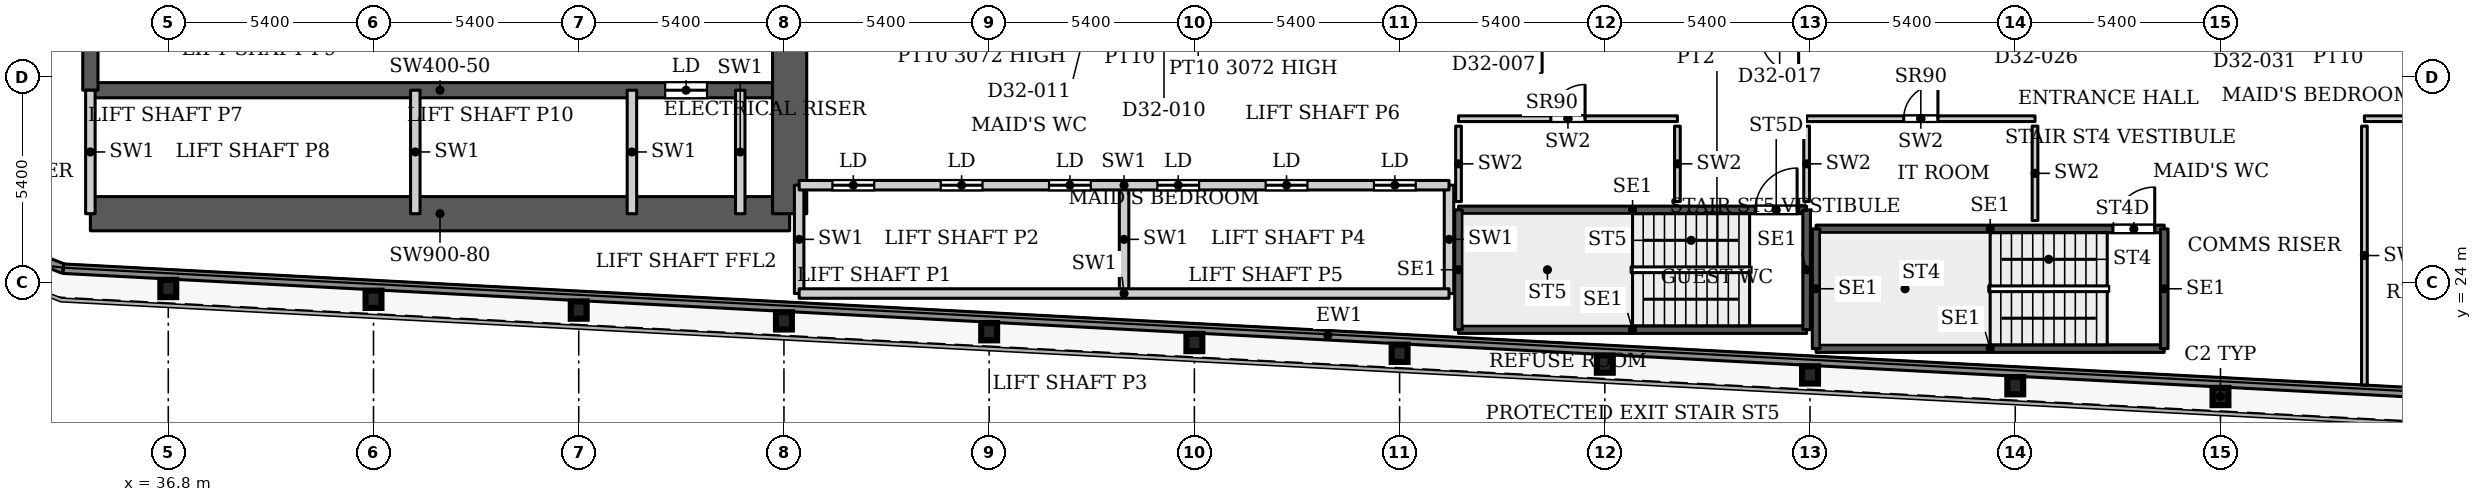
"""IFC4 building model, lengths in metres.
Left out: names, types, materials, properties, quantities, classifications, styles, units other than length and angle.
Written with IfcOpenShell. Run it as: python <this file> out.ifc"""

import sys

from ifc_helpers import new_model, si_unit, direction, frame, frame_2d, origin, origin_2d, place, context, subcontext, project, spatial, rectangle, i_section, extrude, source, transform, mapped, element, fill, save


model = new_model("IFC4")
c1 = context("Model", 3, precision=1e-05, world=origin(), true_north=direction((0.0, 1.0)))
c2 = subcontext(c1, "Body", "Model", "MODEL_VIEW")
j1 = project(units=[si_unit("LENGTHUNIT", "METRE"), si_unit("PLANEANGLEUNIT", "RADIAN")], contexts=[c1])
p1 = place(None, origin())
s1 = spatial("IfcSite", under=j1, at=p1, CompositionType="ELEMENT")
p2 = place(p1, origin())
s2 = spatial("IfcBuilding", under=s1, at=p2, CompositionType="ELEMENT")
p3 = place(p2, frame((0.0, 0.0, 140.9)))
s3 = spatial("IfcBuildingStorey", under=s2, at=p3, CompositionType="ELEMENT", Elevation=140.9)
for number, where, z_axis, x_axis in (
    (1, (90.8, 20.99, 0.0), (0.0, 0.0, 1.0), (1.0, 0.0, 0.0)),
    (2, (85.4, 21.274, 0.0), (0.0, 0.0, 1.0), (1.0, 0.0, 0.0)),
    (3, (80.0, 21.558, 0.0), (0.0, 0.0, 1.0), (1.0, 0.0, 0.0)),
    (4, (74.6, 21.843, 0.0), (0.0, 0.0, 1.0), (1.0, 0.0, 0.0)),
    (5, (69.2, 22.127, 0.0), (0.0, 0.0, 1.0), (1.0, 0.0, 0.0)),
    (6, (63.8, 22.411, 0.0), (0.0, 0.0, 1.0), (1.0, 0.0, 0.0)),
    (7, (58.4, 22.695, 0.0), (0.0, 0.0, 1.0), (1.0, 0.0, 0.0)),
    (8, (53.0, 22.98, 0.0), (0.0, 0.0, 1.0), (1.0, 0.0, 0.0)),
    (9, (47.6, 23.264, 0.0), (0.0, 0.0, 1.0), (1.0, 0.0, 0.0)),
    (10, (42.2, 23.548, 0.0), (0.0, 0.0, 1.0), (1.0, 0.0, 0.0)),
    (11, (36.8, 23.832, 0.0), (0.0, 0.0, 1.0), (1.0, 0.0, 0.0)),
):
    element("IfcColumn", number, at=place(p3, frame(where, z_axis=z_axis, x_axis=x_axis)), inside=s3, PredefinedType="COLUMN", context=c2, shape_type="SweptSolid", body=[
        extrude(i_section(OverallWidth=0.418, OverallDepth=0.455, WebThickness=0.042, FlangeThickness=0.068, FilletRadius=0.014, at=origin_2d()), origin(), (0.0, 0.0, 1.0), 3.9),
    ])
p4 = place(p3, frame((34.75, 25.8, 0.0), z_axis=(0.0, 0.0, 1.0), x_axis=(1.0, 0.0, 0.0)))
e12 = element("IfcWall", 12, at=p4, inside=s3, PredefinedType="SHEAR", context=c2, shape_type="SweptSolid", body=[
    extrude(rectangle(XDim=18.4, YDim=0.9, at=frame_2d((9.2, 0.0))), origin(), (0.0, 0.0, 1.0), 3.9),
])
p5 = place(p3, frame((34.75, 29.05, 0.0), z_axis=(0.0, 0.0, 1.0), x_axis=(1.0, 0.0, 0.0)))
e13 = element("IfcWall", 13, at=p5, inside=s3, PredefinedType="SHEAR", context=c2, shape_type="SweptSolid", body=[
    extrude(rectangle(XDim=18.4, YDim=0.4, at=frame_2d((9.2, 0.0))), origin(), (0.0, 0.0, 1.0), 3.9),
])
p6 = place(p5, frame((15.125, 0.0, 0.0)))
e14 = element("IfcOpeningElement", 14, at=p6, cuts=e13, PredefinedType="OPENING", context=c2, shape_type="SweptSolid", body=[
    extrude(rectangle(XDim=1.1, YDim=2.2, at=frame_2d((0.55, 1.1))), frame((0.0, 0.21, 0.0), z_axis=(0.0, -1.0, 0.0), x_axis=(1.0, 0.0, 0.0)), (0.0, 0.0, 1.0), 0.42),
])
p7 = place(p3, frame((34.75, 29.05, 0.0), z_axis=(0.0, 0.0, 1.0), x_axis=(0.0, 1.0, 0.0)))
e15 = element("IfcWall", 15, at=p7, inside=s3, PredefinedType="SHEAR", context=c2, shape_type="SweptSolid", body=[
    extrude(rectangle(XDim=18.45, YDim=0.4, at=frame_2d((9.225, 0.0))), origin(), (0.0, 0.0, 1.0), 3.9),
])
p8 = place(p7, frame((8.025, 0.0, 0.0)))
e16 = element("IfcOpeningElement", 16, at=p8, cuts=e15, PredefinedType="OPENING", context=c2, shape_type="SweptSolid", body=[
    extrude(rectangle(XDim=1.1, YDim=2.2, at=frame_2d((0.55, 1.1))), frame((0.0, 0.21, 0.0), z_axis=(0.0, -1.0, 0.0), x_axis=(1.0, 0.0, 0.0)), (0.0, 0.0, 1.0), 0.42),
])
p9 = place(p7, frame((10.875, 0.0, 0.0)))
e17 = element("IfcOpeningElement", 17, at=p9, cuts=e15, PredefinedType="OPENING", context=c2, shape_type="SweptSolid", body=[
    extrude(rectangle(XDim=1.1, YDim=2.2, at=frame_2d((0.55, 1.1))), frame((0.0, 0.21, 0.0), z_axis=(0.0, -1.0, 0.0), x_axis=(1.0, 0.0, 0.0)), (0.0, 0.0, 1.0), 0.42),
])
p10 = place(p7, frame((13.725, 0.0, 0.0)))
e18 = element("IfcOpeningElement", 18, at=p10, cuts=e15, PredefinedType="OPENING", context=c2, shape_type="SweptSolid", body=[
    extrude(rectangle(XDim=1.1, YDim=2.2, at=frame_2d((0.55, 1.1))), frame((0.0, 0.21, 0.0), z_axis=(0.0, -1.0, 0.0), x_axis=(1.0, 0.0, 0.0)), (0.0, 0.0, 1.0), 0.42),
])
p11 = place(p7, frame((15.95, 0.0, 0.0)))
e19 = element("IfcOpeningElement", 19, at=p11, cuts=e15, PredefinedType="OPENING", context=c2, shape_type="SweptSolid", body=[
    extrude(rectangle(XDim=1.1, YDim=2.2, at=frame_2d((0.55, 1.1))), frame((0.0, 0.21, 0.0), z_axis=(0.0, -1.0, 0.0), x_axis=(1.0, 0.0, 0.0)), (0.0, 0.0, 1.0), 0.42),
])
p12 = place(p3, frame((53.15, 25.8, 0.0), z_axis=(0.0, 0.0, 1.0), x_axis=(0.0, 1.0, 0.0)))
e20 = element("IfcWall", 20, at=p12, inside=s3, PredefinedType="SHEAR", context=c2, shape_type="SweptSolid", body=[
    extrude(rectangle(XDim=10.4, YDim=0.9, at=frame_2d((5.2, 0.0))), origin(), (0.0, 0.0, 1.0), 3.9),
])
p13 = place(p3, frame((34.039, 24.353, 0.0), z_axis=(0.0, 0.0, 1.0), x_axis=(-0.929352825399, 0.369192803184, 0.0)))
e21 = element("IfcWall", 21, at=p13, inside=s3, PredefinedType="SOLIDWALL", context=c2, shape_type="SweptSolid", body=[
    extrude(rectangle(XDim=4.656, YDim=0.25, at=frame_2d((2.328, 0.0))), origin(), (0.0, 0.0, 1.0), 3.75),
])
p14 = place(p3, frame((100.586, 20.85, 0.0), z_axis=(0.0, 0.0, 1.0), x_axis=(-0.99861746497, 0.052565755559, 0.0)))
e22 = element("IfcWall", 22, at=p14, inside=s3, PredefinedType="SOLIDWALL", context=c2, shape_type="SweptSolid", body=[
    extrude(rectangle(XDim=66.639, YDim=0.25, at=frame_2d((33.319, 0.0))), origin(), (0.0, 0.0, 1.0), 3.75),
])
p15 = place(p3, frame((80.16, 22.25, 0.0), z_axis=(0.0, 0.0, 1.0), x_axis=(1.0, 0.0, 0.0)))
e23 = element("IfcWall", 23, at=p15, inside=s3, PredefinedType="SHEAR", context=c2, shape_type="SweptSolid", body=[
    extrude(rectangle(XDim=9.16, YDim=0.2, at=frame_2d((4.58, 0.0))), origin(), (0.0, 0.0, 1.0), 3.9),
])
p16 = place(p3, frame((80.16, 25.4, 0.0), z_axis=(0.0, 0.0, 1.0), x_axis=(1.0, 0.0, 0.0)))
e24 = element("IfcWall", 24, at=p16, inside=s3, PredefinedType="SHEAR", context=c2, shape_type="SweptSolid", body=[
    extrude(rectangle(XDim=9.16, YDim=0.2, at=frame_2d((4.58, 0.0))), origin(), (0.0, 0.0, 1.0), 3.9),
])
p17 = place(p16, frame((7.81, 0.0, 0.0)))
e25 = element("IfcOpeningElement", 25, at=p17, cuts=e24, PredefinedType="OPENING", context=c2, shape_type="SweptSolid", body=[
    extrude(rectangle(XDim=1.1, YDim=2.2, at=frame_2d((0.55, 1.1))), frame((0.0, 0.11, 0.0), z_axis=(0.0, -1.0, 0.0), x_axis=(1.0, 0.0, 0.0)), (0.0, 0.0, 1.0), 0.22),
])
for number, where, z_axis, x_axis in (
    (26, (80.16, 22.25, 0.0), (0.0, 0.0, 1.0), (0.0, 1.0, 0.0)),
    (27, (89.32, 22.25, 0.0), (0.0, 0.0, 1.0), (0.0, 1.0, 0.0)),
):
    element("IfcWall", number, at=place(p3, frame(where, z_axis=z_axis, x_axis=x_axis)), inside=s3, PredefinedType="SHEAR", context=c2, shape_type="SweptSolid", body=[
        extrude(rectangle(XDim=3.15, YDim=0.2, at=frame_2d((1.575, 0.0))), origin(), (0.0, 0.0, 1.0), 3.9),
    ])
p18 = place(p3, frame((70.75, 22.75, 0.0), z_axis=(0.0, 0.0, 1.0), x_axis=(1.0, 0.0, 0.0)))
e28 = element("IfcWall", 28, at=p18, inside=s3, PredefinedType="SHEAR", context=c2, shape_type="SweptSolid", body=[
    extrude(rectangle(XDim=9.16, YDim=0.2, at=frame_2d((4.58, 0.0))), origin(), (0.0, 0.0, 1.0), 3.9),
])
p19 = place(p3, frame((70.75, 25.9, 0.0), z_axis=(0.0, 0.0, 1.0), x_axis=(1.0, 0.0, 0.0)))
e29 = element("IfcWall", 29, at=p19, inside=s3, PredefinedType="SHEAR", context=c2, shape_type="SweptSolid", body=[
    extrude(rectangle(XDim=9.16, YDim=0.2, at=frame_2d((4.58, 0.0))), origin(), (0.0, 0.0, 1.0), 3.9),
])
p20 = place(p19, frame((7.81, 0.0, 0.0)))
e30 = element("IfcOpeningElement", 30, at=p20, cuts=e29, PredefinedType="OPENING", context=c2, shape_type="SweptSolid", body=[
    extrude(rectangle(XDim=1.1, YDim=2.2, at=frame_2d((0.55, 1.1))), frame((0.0, 0.11, 0.0), z_axis=(0.0, -1.0, 0.0), x_axis=(1.0, 0.0, 0.0)), (0.0, 0.0, 1.0), 0.22),
])
for number, where, z_axis, x_axis in (
    (31, (70.75, 22.75, 0.0), (0.0, 0.0, 1.0), (0.0, 1.0, 0.0)),
    (32, (79.91, 22.75, 0.0), (0.0, 0.0, 1.0), (0.0, 1.0, 0.0)),
):
    element("IfcWall", number, at=place(p3, frame(where, z_axis=z_axis, x_axis=x_axis)), inside=s3, PredefinedType="SHEAR", context=c2, shape_type="SweptSolid", body=[
        extrude(rectangle(XDim=3.15, YDim=0.2, at=frame_2d((1.575, 0.0))), origin(), (0.0, 0.0, 1.0), 3.9),
    ])
for number, where, z_axis, x_axis in (
    (33, (34.75, 25.8, 0.0), (0.0, 0.0, 1.0), (0.0, 1.0, 0.0)),
    (34, (43.3, 25.8, 0.0), (0.0, 0.0, 1.0), (0.0, 1.0, 0.0)),
    (35, (49.0, 25.8, 0.0), (0.0, 0.0, 1.0), (0.0, 1.0, 0.0)),
    (36, (51.85, 25.8, 0.0), (0.0, 0.0, 1.0), (0.0, 1.0, 0.0)),
):
    element("IfcWall", number, at=place(p3, frame(where, z_axis=z_axis, x_axis=x_axis)), inside=s3, PredefinedType="PARTITIONING", context=c2, shape_type="SweptSolid", body=[
        extrude(rectangle(XDim=3.25, YDim=0.25, at=frame_2d((1.625, 0.0))), origin(), (0.0, 0.0, 1.0), 3.9),
    ])
for number, where, z_axis, x_axis in (
    (37, (53.4, 23.7, 0.0), (0.0, 0.0, 1.0), (0.0, 1.0, 0.0)),
    (38, (61.95, 23.7, 0.0), (0.0, 0.0, 1.0), (0.0, 1.0, 0.0)),
    (39, (70.5, 23.7, 0.0), (0.0, 0.0, 1.0), (0.0, 1.0, 0.0)),
):
    element("IfcWall", number, at=place(p3, frame(where, z_axis=z_axis, x_axis=x_axis)), inside=s3, PredefinedType="PARTITIONING", context=c2, shape_type="SweptSolid", body=[
        extrude(rectangle(XDim=2.85, YDim=0.25, at=frame_2d((1.425, 0.0))), origin(), (0.0, 0.0, 1.0), 3.9),
    ])
p21 = place(p3, frame((53.4, 23.7, 0.0), z_axis=(0.0, 0.0, 1.0), x_axis=(1.0, 0.0, 0.0)))
e40 = element("IfcWall", 40, at=p21, inside=s3, PredefinedType="PARTITIONING", context=c2, shape_type="SweptSolid", body=[
    extrude(rectangle(XDim=17.1, YDim=0.25, at=frame_2d((8.55, 0.0))), origin(), (0.0, 0.0, 1.0), 3.9),
])
p22 = place(p3, frame((53.4, 26.55, 0.0), z_axis=(0.0, 0.0, 1.0), x_axis=(1.0, 0.0, 0.0)))
e41 = element("IfcWall", 41, at=p22, inside=s3, PredefinedType="PARTITIONING", context=c2, shape_type="SweptSolid", body=[
    extrude(rectangle(XDim=17.1, YDim=0.25, at=frame_2d((8.55, 0.0))), origin(), (0.0, 0.0, 1.0), 3.9),
])
p23 = place(p22, frame((0.875, 0.0, 0.0)))
e42 = element("IfcOpeningElement", 42, at=p23, cuts=e41, PredefinedType="OPENING", context=c2, shape_type="SweptSolid", body=[
    extrude(rectangle(XDim=1.1, YDim=2.2, at=frame_2d((0.55, 1.1))), frame((0.0, 0.135, 0.0), z_axis=(0.0, -1.0, 0.0), x_axis=(1.0, 0.0, 0.0)), (0.0, 0.0, 1.0), 0.27),
])
p24 = place(p22, frame((3.725, 0.0, 0.0)))
e43 = element("IfcOpeningElement", 43, at=p24, cuts=e41, PredefinedType="OPENING", context=c2, shape_type="SweptSolid", body=[
    extrude(rectangle(XDim=1.1, YDim=2.2, at=frame_2d((0.55, 1.1))), frame((0.0, 0.135, 0.0), z_axis=(0.0, -1.0, 0.0), x_axis=(1.0, 0.0, 0.0)), (0.0, 0.0, 1.0), 0.27),
])
p25 = place(p22, frame((6.575, 0.0, 0.0)))
e44 = element("IfcOpeningElement", 44, at=p25, cuts=e41, PredefinedType="OPENING", context=c2, shape_type="SweptSolid", body=[
    extrude(rectangle(XDim=1.1, YDim=2.2, at=frame_2d((0.55, 1.1))), frame((0.0, 0.135, 0.0), z_axis=(0.0, -1.0, 0.0), x_axis=(1.0, 0.0, 0.0)), (0.0, 0.0, 1.0), 0.27),
])
p26 = place(p22, frame((9.425, 0.0, 0.0)))
e45 = element("IfcOpeningElement", 45, at=p26, cuts=e41, PredefinedType="OPENING", context=c2, shape_type="SweptSolid", body=[
    extrude(rectangle(XDim=1.1, YDim=2.2, at=frame_2d((0.55, 1.1))), frame((0.0, 0.135, 0.0), z_axis=(0.0, -1.0, 0.0), x_axis=(1.0, 0.0, 0.0)), (0.0, 0.0, 1.0), 0.27),
])
p27 = place(p22, frame((12.275, 0.0, 0.0)))
e46 = element("IfcOpeningElement", 46, at=p27, cuts=e41, PredefinedType="OPENING", context=c2, shape_type="SweptSolid", body=[
    extrude(rectangle(XDim=1.1, YDim=2.2, at=frame_2d((0.55, 1.1))), frame((0.0, 0.135, 0.0), z_axis=(0.0, -1.0, 0.0), x_axis=(1.0, 0.0, 0.0)), (0.0, 0.0, 1.0), 0.27),
])
p28 = place(p22, frame((15.125, 0.0, 0.0)))
e47 = element("IfcOpeningElement", 47, at=p28, cuts=e41, PredefinedType="OPENING", context=c2, shape_type="SweptSolid", body=[
    extrude(rectangle(XDim=1.1, YDim=2.2, at=frame_2d((0.55, 1.1))), frame((0.0, 0.135, 0.0), z_axis=(0.0, -1.0, 0.0), x_axis=(1.0, 0.0, 0.0)), (0.0, 0.0, 1.0), 0.27),
])
p29 = place(p3, frame((70.75, 28.3, 0.0), z_axis=(0.0, 0.0, 1.0), x_axis=(1.0, 0.0, 0.0)))
e48 = element("IfcWall", 48, at=p29, inside=s3, PredefinedType="PARTITIONING", context=c2, shape_type="SweptSolid", body=[
    extrude(rectangle(XDim=5.76, YDim=0.15, at=frame_2d((2.88, 0.0))), origin(), (0.0, 0.0, 1.0), 3.9),
])
p30 = place(p29, frame((2.43, 0.0, 0.0)))
e49 = element("IfcOpeningElement", 49, at=p30, cuts=e48, PredefinedType="OPENING", context=c2, shape_type="SweptSolid", body=[
    extrude(rectangle(XDim=0.9, YDim=2.2, at=frame_2d((0.45, 1.1))), frame((0.0, 0.085, 0.0), z_axis=(0.0, -1.0, 0.0), x_axis=(1.0, 0.0, 0.0)), (0.0, 0.0, 1.0), 0.17),
])
for number, where, z_axis, x_axis in (
    (50, (70.75, 26.12, 0.0), (0.0, 0.0, 1.0), (0.0, 1.0, 0.0)),
    (51, (76.51, 26.12, 0.0), (0.0, 0.0, 1.0), (0.0, 1.0, 0.0)),
):
    element("IfcWall", number, at=place(p3, frame(where, z_axis=z_axis, x_axis=x_axis)), inside=s3, PredefinedType="PARTITIONING", context=c2, shape_type="SweptSolid", body=[
        extrude(rectangle(XDim=1.985, YDim=0.15, at=frame_2d((0.992, 0.0))), origin(), (0.0, 0.0, 1.0), 3.9),
    ])
p31 = place(p3, frame((79.91, 28.3, 0.0), z_axis=(0.0, 0.0, 1.0), x_axis=(1.0, 0.0, 0.0)))
e52 = element("IfcWall", 52, at=p31, inside=s3, PredefinedType="PARTITIONING", context=c2, shape_type="SweptSolid", body=[
    extrude(rectangle(XDim=6.01, YDim=0.15, at=frame_2d((3.005, 0.0))), origin(), (0.0, 0.0, 1.0), 3.9),
])
p32 = place(p31, frame((2.555, 0.0, 0.0)))
e53 = element("IfcOpeningElement", 53, at=p32, cuts=e52, PredefinedType="OPENING", context=c2, shape_type="SweptSolid", body=[
    extrude(rectangle(XDim=0.9, YDim=2.2, at=frame_2d((0.45, 1.1))), frame((0.0, 0.085, 0.0), z_axis=(0.0, -1.0, 0.0), x_axis=(1.0, 0.0, 0.0)), (0.0, 0.0, 1.0), 0.17),
])
p33 = place(p3, frame((79.91, 26.12, 0.0), z_axis=(0.0, 0.0, 1.0), x_axis=(0.0, 1.0, 0.0)))
e54 = element("IfcWall", 54, at=p33, inside=s3, PredefinedType="PARTITIONING", context=c2, shape_type="SweptSolid", body=[
    extrude(rectangle(XDim=1.985, YDim=0.15, at=frame_2d((0.992, 0.0))), origin(), (0.0, 0.0, 1.0), 3.9),
])
p34 = place(p3, frame((85.92, 25.62, 0.0), z_axis=(0.0, 0.0, 1.0), x_axis=(0.0, 1.0, 0.0)))
e55 = element("IfcWall", 55, at=p34, inside=s3, PredefinedType="PARTITIONING", context=c2, shape_type="SweptSolid", body=[
    extrude(rectangle(XDim=2.485, YDim=0.15, at=frame_2d((1.242, 0.0))), origin(), (0.0, 0.0, 1.0), 3.9),
])
p35 = place(p3, frame((94.587, 28.3, 0.0), z_axis=(0.0, 0.0, 1.0), x_axis=(1.0, 0.0, 0.0)))
e56 = element("IfcWall", 56, at=p35, inside=s3, PredefinedType="PARTITIONING", context=c2, shape_type="SweptSolid", body=[
    extrude(rectangle(XDim=5.311, YDim=0.15, at=frame_2d((2.656, 0.0))), origin(), (0.0, 0.0, 1.0), 3.9),
])
p36 = place(p35, frame((1.256, 0.0, 0.0)))
e57 = element("IfcOpeningElement", 57, at=p36, cuts=e56, PredefinedType="OPENING", context=c2, shape_type="SweptSolid", body=[
    extrude(rectangle(XDim=0.9, YDim=2.2, at=frame_2d((0.45, 1.1))), frame((0.0, 0.085, 0.0), z_axis=(0.0, -1.0, 0.0), x_axis=(1.0, 0.0, 0.0)), (0.0, 0.0, 1.0), 0.17),
])
p37 = place(p3, frame((94.587, 21.293, 0.0), z_axis=(0.0, 0.0, 1.0), x_axis=(0.0, 1.0, 0.0)))
e58 = element("IfcWall", 58, at=p37, inside=s3, PredefinedType="PARTITIONING", context=c2, shape_type="SweptSolid", body=[
    extrude(rectangle(XDim=6.812, YDim=0.15, at=frame_2d((3.406, 0.0))), origin(), (0.0, 0.0, 1.0), 3.9),
])
m1 = source(origin(), c2, "Body", "SweptSolid", [
    extrude(rectangle(XDim=1.1, YDim=2.2, at=frame_2d((0.55, 1.1))), frame((0.0, 0.025, 0.0), z_axis=(0.0, -1.0, 0.0), x_axis=(1.0, 0.0, 0.0)), (0.0, 0.0, 1.0), 0.05),
])
p38 = place(p23, origin())
e59 = element("IfcDoor", 59, at=p38, inside=s3, OperationType="SLIDING_TO_LEFT", PredefinedType="DOOR", context=c2, shape_type="MappedRepresentation", body=[
    mapped(m1, transform((0.0, 0.0, 0.0), x_axis=(1.0, 0.0, 0.0), y_axis=(0.0, 1.0, 0.0), z_axis=(0.0, 0.0, 1.0), scale=1.0)),
])
fill(e42, e59)
p39 = place(p24, origin())
e60 = element("IfcDoor", 60, at=p39, inside=s3, OperationType="SLIDING_TO_LEFT", PredefinedType="DOOR", context=c2, shape_type="MappedRepresentation", body=[
    mapped(m1, transform((0.0, 0.0, 0.0), x_axis=(1.0, 0.0, 0.0), y_axis=(0.0, 1.0, 0.0), z_axis=(0.0, 0.0, 1.0), scale=1.0)),
])
fill(e43, e60)
p40 = place(p25, origin())
e61 = element("IfcDoor", 61, at=p40, inside=s3, OperationType="SLIDING_TO_LEFT", PredefinedType="DOOR", context=c2, shape_type="MappedRepresentation", body=[
    mapped(m1, transform((0.0, 0.0, 0.0), x_axis=(1.0, 0.0, 0.0), y_axis=(0.0, 1.0, 0.0), z_axis=(0.0, 0.0, 1.0), scale=1.0)),
])
fill(e44, e61)
p41 = place(p26, origin())
e62 = element("IfcDoor", 62, at=p41, inside=s3, OperationType="SLIDING_TO_LEFT", PredefinedType="DOOR", context=c2, shape_type="MappedRepresentation", body=[
    mapped(m1, transform((0.0, 0.0, 0.0), x_axis=(1.0, 0.0, 0.0), y_axis=(0.0, 1.0, 0.0), z_axis=(0.0, 0.0, 1.0), scale=1.0)),
])
fill(e45, e62)
p42 = place(p27, origin())
e63 = element("IfcDoor", 63, at=p42, inside=s3, OperationType="SLIDING_TO_LEFT", PredefinedType="DOOR", context=c2, shape_type="MappedRepresentation", body=[
    mapped(m1, transform((0.0, 0.0, 0.0), x_axis=(1.0, 0.0, 0.0), y_axis=(0.0, 1.0, 0.0), z_axis=(0.0, 0.0, 1.0), scale=1.0)),
])
fill(e46, e63)
p43 = place(p28, origin())
e64 = element("IfcDoor", 64, at=p43, inside=s3, OperationType="SLIDING_TO_LEFT", PredefinedType="DOOR", context=c2, shape_type="MappedRepresentation", body=[
    mapped(m1, transform((0.0, 0.0, 0.0), x_axis=(1.0, 0.0, 0.0), y_axis=(0.0, 1.0, 0.0), z_axis=(0.0, 0.0, 1.0), scale=1.0)),
])
fill(e47, e64)
p44 = place(p6, origin())
e65 = element("IfcDoor", 65, at=p44, inside=s3, OperationType="SLIDING_TO_LEFT", PredefinedType="DOOR", context=c2, shape_type="MappedRepresentation", body=[
    mapped(m1, transform((0.0, 0.0, 0.0), x_axis=(1.0, 0.0, 0.0), y_axis=(0.0, 1.0, 0.0), z_axis=(0.0, 0.0, 1.0), scale=1.0)),
])
fill(e14, e65)
m2 = source(origin(), c2, "Body", "SweptSolid", [
    extrude(rectangle(XDim=0.9, YDim=2.2, at=frame_2d((0.45, 1.1))), frame((0.0, 0.025, 0.0), z_axis=(0.0, -1.0, 0.0), x_axis=(1.0, 0.0, 0.0)), (0.0, 0.0, 1.0), 0.05),
])
p45 = place(p30, origin())
e66 = element("IfcDoor", 66, at=p45, inside=s3, OperationType="SINGLE_SWING_LEFT", PredefinedType="DOOR", context=c2, shape_type="MappedRepresentation", body=[
    mapped(m2, transform((0.0, 0.0, 0.0), x_axis=(1.0, 0.0, 0.0), y_axis=(0.0, 1.0, 0.0), z_axis=(0.0, 0.0, 1.0), scale=1.0)),
])
fill(e49, e66)
p46 = place(p32, origin())
e67 = element("IfcDoor", 67, at=p46, inside=s3, OperationType="SINGLE_SWING_LEFT", PredefinedType="DOOR", context=c2, shape_type="MappedRepresentation", body=[
    mapped(m2, transform((0.0, 0.0, 0.0), x_axis=(1.0, 0.0, 0.0), y_axis=(0.0, 1.0, 0.0), z_axis=(0.0, 0.0, 1.0), scale=1.0)),
])
fill(e53, e67)
m3 = source(origin(), c2, "Body", "SweptSolid", [
    extrude(rectangle(XDim=1.1, YDim=2.2, at=frame_2d((0.55, 1.1))), frame((0.0, 0.025, 0.0), z_axis=(0.0, -1.0, 0.0), x_axis=(1.0, 0.0, 0.0)), (0.0, 0.0, 1.0), 0.05),
])
p47 = place(p17, origin())
e68 = element("IfcDoor", 68, at=p47, inside=s3, OperationType="SINGLE_SWING_LEFT", PredefinedType="DOOR", context=c2, shape_type="MappedRepresentation", body=[
    mapped(m3, transform((0.0, 0.0, 0.0), x_axis=(1.0, 0.0, 0.0), y_axis=(0.0, 1.0, 0.0), z_axis=(0.0, 0.0, 1.0), scale=1.0)),
])
fill(e25, e68)
p48 = place(p20, origin())
e69 = element("IfcDoor", 69, at=p48, inside=s3, OperationType="SINGLE_SWING_LEFT", PredefinedType="DOOR", context=c2, shape_type="MappedRepresentation", body=[
    mapped(m3, transform((0.0, 0.0, 0.0), x_axis=(1.0, 0.0, 0.0), y_axis=(0.0, 1.0, 0.0), z_axis=(0.0, 0.0, 1.0), scale=1.0)),
])
fill(e30, e69)
save(model, sys.argv[1])
